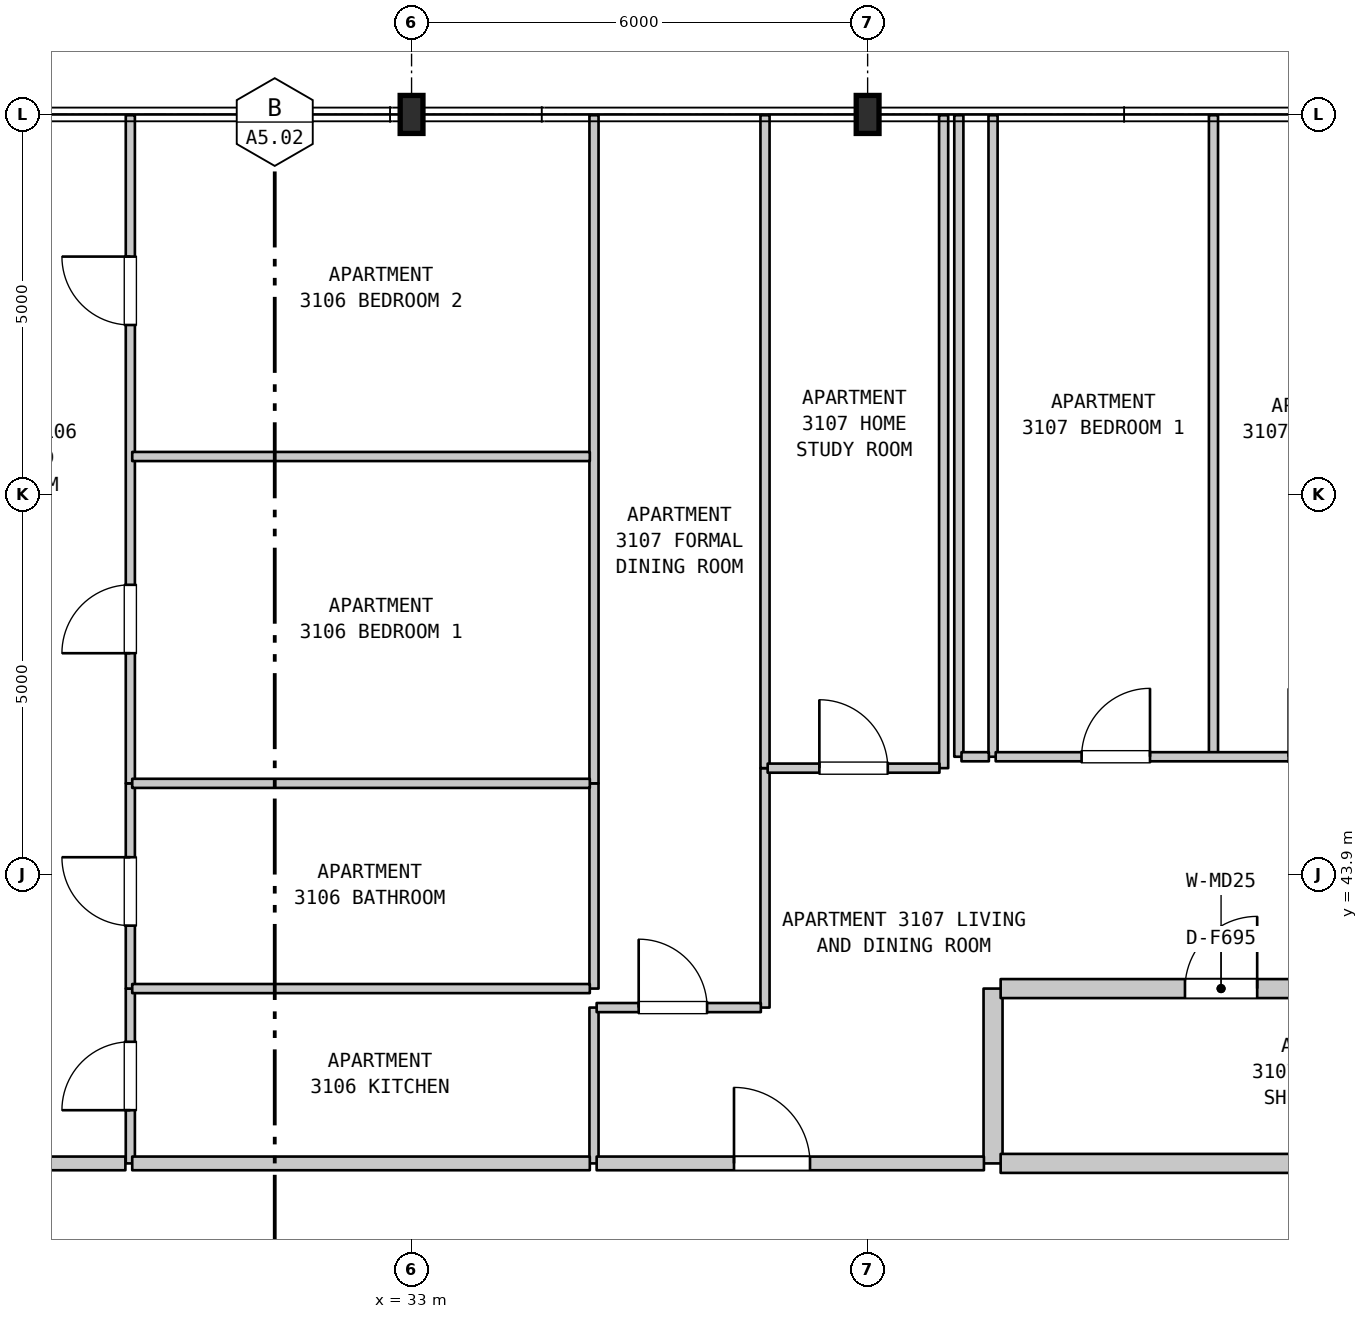
"""IFC4 building model, lengths in metres.
Left out: names, types, materials, properties, quantities, classifications, styles, units other than length and angle.
Written with IfcOpenShell. Run it as: python <this file> out.ifc"""

import sys

from ifc_helpers import new_model, si_unit, direction, frame, frame_2d, origin, origin_2d, place, context, subcontext, project, spatial, rectangle, i_section, extrude, element, fill, save


model = new_model("IFC4")
c1 = context("Model", 3, precision=1e-05, world=origin(), true_north=direction((0.0, 1.0)))
c2 = subcontext(c1, "Body", "Model", "MODEL_VIEW")
j1 = project(units=[si_unit("LENGTHUNIT", "METRE"), si_unit("PLANEANGLEUNIT", "RADIAN")], contexts=[c1])
p1 = place(None, origin())
s1 = spatial("IfcSite", under=j1, at=p1, CompositionType="ELEMENT")
p2 = place(p1, origin())
s2 = spatial("IfcBuilding", under=s1, at=p2, CompositionType="ELEMENT")
p3 = place(p2, frame((0.0, 0.0, 129.8)))
s3 = spatial("IfcBuildingStorey", under=s2, at=p3, CompositionType="ELEMENT", Elevation=129.8)
for number, where, z_axis, x_axis in (
    (1, (33.0, 53.9, 0.0), (0.0, 0.0, 1.0), (1.0, 0.0, 0.0)),
    (2, (39.0, 53.9, 0.0), (0.0, 0.0, 1.0), (1.0, 0.0, 0.0)),
):
    element("IfcColumn", number, at=place(p3, frame(where, z_axis=z_axis, x_axis=x_axis)), inside=s3, PredefinedType="COLUMN", context=c2, shape_type="SweptSolid", body=[
        extrude(i_section(OverallWidth=0.3, OverallDepth=0.5, WebThickness=0.014, FlangeThickness=0.028, FilletRadius=0.027, at=origin_2d()), origin(), (0.0, 0.0, 1.0), 3.7),
    ])
p4 = place(p3, frame((29.3, 40.1, 0.0), z_axis=(0.0, 0.0, 1.0), x_axis=(0.0, 1.0, 0.0)))
e3 = element("IfcWall", 3, at=p4, inside=s3, PredefinedType="PARTITIONING", context=c2, shape_type="SweptSolid", body=[
    extrude(rectangle(XDim=2.3, YDim=0.12, at=frame_2d((1.15, 0.0))), origin(), (0.0, 0.0, 1.0), 3.385),
])
p5 = place(p4, frame((0.7, 0.0, 0.0)))
e4 = element("IfcOpeningElement", 4, at=p5, cuts=e3, PredefinedType="OPENING", context=c2, shape_type="SweptSolid", body=[
    extrude(rectangle(XDim=0.9, YDim=2.15, at=frame_2d((0.45, 1.075))), frame((0.0, 0.07, 0.0), z_axis=(0.0, -1.0, 0.0), x_axis=(1.0, 0.0, 0.0)), (0.0, 0.0, 1.0), 0.14),
])
p6 = place(p3, frame((29.3, 42.4, 0.0), z_axis=(0.0, 0.0, 1.0), x_axis=(0.0, 1.0, 0.0)))
e5 = element("IfcWall", 5, at=p6, inside=s3, PredefinedType="PARTITIONING", context=c2, shape_type="SweptSolid", body=[
    extrude(rectangle(XDim=2.7, YDim=0.12, at=frame_2d((1.35, 0.0))), origin(), (0.0, 0.0, 1.0), 3.385),
])
p7 = place(p6, frame((0.828, 0.0, 0.0)))
e6 = element("IfcOpeningElement", 6, at=p7, cuts=e5, PredefinedType="OPENING", context=c2, shape_type="SweptSolid", body=[
    extrude(rectangle(XDim=0.9, YDim=2.1, at=frame_2d((0.45, 1.05))), frame((0.0, 0.07, 0.0), z_axis=(0.0, -1.0, 0.0), x_axis=(1.0, 0.0, 0.0)), (0.0, 0.0, 1.0), 0.14),
])
p8 = place(p3, frame((29.3, 45.1, 0.0), z_axis=(0.0, 0.0, 1.0), x_axis=(0.0, 1.0, 0.0)))
e7 = element("IfcWall", 7, at=p8, inside=s3, PredefinedType="PARTITIONING", context=c2, shape_type="SweptSolid", body=[
    extrude(rectangle(XDim=8.79, YDim=0.12, at=frame_2d((4.395, 0.0))), origin(), (0.0, 0.0, 1.0), 3.385),
])
p9 = place(p8, frame((1.712, 0.0, 0.0)))
e8 = element("IfcOpeningElement", 8, at=p9, cuts=e7, PredefinedType="OPENING", context=c2, shape_type="SweptSolid", body=[
    extrude(rectangle(XDim=0.9, YDim=2.15, at=frame_2d((0.45, 1.075))), frame((0.0, 0.07, 0.0), z_axis=(0.0, -1.0, 0.0), x_axis=(1.0, 0.0, 0.0)), (0.0, 0.0, 1.0), 0.14),
])
p10 = place(p8, frame((6.03, 0.0, 0.0)))
e9 = element("IfcOpeningElement", 9, at=p10, cuts=e7, PredefinedType="OPENING", context=c2, shape_type="SweptSolid", body=[
    extrude(rectangle(XDim=0.9, YDim=2.15, at=frame_2d((0.45, 1.075))), frame((0.0, 0.07, 0.0), z_axis=(0.0, -1.0, 0.0), x_axis=(1.0, 0.0, 0.0)), (0.0, 0.0, 1.0), 0.14),
])
p11 = place(p3, frame((35.4, 40.1, 0.0), z_axis=(0.0, 0.0, 1.0), x_axis=(0.0, 1.0, 0.0)))
e10 = element("IfcWall", 10, at=p11, inside=s3, PredefinedType="PARTITIONING", context=c2, shape_type="SweptSolid", body=[
    extrude(rectangle(XDim=2.05, YDim=0.12, at=frame_2d((1.025, 0.0))), origin(), (0.0, 0.0, 1.0), 3.385),
])
p12 = place(p3, frame((35.4, 42.4, 0.0), z_axis=(0.0, 0.0, 1.0), x_axis=(0.0, 1.0, 0.0)))
e11 = element("IfcWall", 11, at=p12, inside=s3, PredefinedType="PARTITIONING", context=c2, shape_type="SweptSolid", body=[
    extrude(rectangle(XDim=2.7, YDim=0.12, at=frame_2d((1.35, 0.0))), origin(), (0.0, 0.0, 1.0), 3.385),
])
p13 = place(p3, frame((35.4, 45.1, 0.0), z_axis=(0.0, 0.0, 1.0), x_axis=(0.0, 1.0, 0.0)))
e12 = element("IfcWall", 12, at=p13, inside=s3, PredefinedType="PARTITIONING", context=c2, shape_type="SweptSolid", body=[
    extrude(rectangle(XDim=8.79, YDim=0.12, at=frame_2d((4.395, 0.0))), origin(), (0.0, 0.0, 1.0), 3.385),
])
p14 = place(p3, frame((37.65, 42.15, 0.0), z_axis=(0.0, 0.0, 1.0), x_axis=(0.0, 1.0, 0.0)))
e13 = element("IfcWall", 13, at=p14, inside=s3, PredefinedType="PARTITIONING", context=c2, shape_type="SweptSolid", body=[
    extrude(rectangle(XDim=3.15, YDim=0.12, at=frame_2d((1.575, 0.0))), origin(), (0.0, 0.0, 1.0), 3.385),
])
for number, where, z_axis, x_axis in (
    (14, (37.65, 45.3, 0.0), (0.0, 0.0, 1.0), (0.0, 1.0, 0.0)),
    (15, (40.0, 45.3, 0.0), (0.0, 0.0, 1.0), (0.0, 1.0, 0.0)),
):
    element("IfcWall", number, at=place(p3, frame(where, z_axis=z_axis, x_axis=x_axis)), inside=s3, PredefinedType="PARTITIONING", context=c2, shape_type="SweptSolid", body=[
        extrude(rectangle(XDim=8.59, YDim=0.12, at=frame_2d((4.295, 0.0))), origin(), (0.0, 0.0, 1.0), 3.385),
    ])
p15 = place(p3, frame((40.2, 45.45, 0.0), z_axis=(0.0, 0.0, 1.0), x_axis=(0.0, 1.0, 0.0)))
e16 = element("IfcWall", 16, at=p15, inside=s3, PredefinedType="PARTITIONING", context=c2, shape_type="SweptSolid", body=[
    extrude(rectangle(XDim=8.44, YDim=0.12, at=frame_2d((4.22, 0.0))), origin(), (0.0, 0.0, 1.0), 3.385),
])
p16 = place(p3, frame((40.65, 40.1, 0.0), z_axis=(0.0, 0.0, 1.0), x_axis=(0.0, 1.0, 0.0)))
e17 = element("IfcWall", 17, at=p16, inside=s3, PredefinedType="STANDARD", context=c2, shape_type="SweptSolid", body=[
    extrude(rectangle(XDim=2.3, YDim=0.25, at=frame_2d((1.15, 0.0))), origin(), (0.0, 0.0, 1.0), 3.385),
])
for number, where, z_axis, x_axis in (
    (18, (40.65, 45.45, 0.0), (0.0, 0.0, 1.0), (0.0, 1.0, 0.0)),
    (19, (43.55, 45.45, 0.0), (0.0, 0.0, 1.0), (0.0, 1.0, 0.0)),
):
    element("IfcWall", number, at=place(p3, frame(where, z_axis=z_axis, x_axis=x_axis)), inside=s3, PredefinedType="PARTITIONING", context=c2, shape_type="SweptSolid", body=[
        extrude(rectangle(XDim=8.44, YDim=0.12, at=frame_2d((4.22, 0.0))), origin(), (0.0, 0.0, 1.0), 3.385),
    ])
p17 = place(p3, frame((20.475, 40.1, 0.0), z_axis=(0.0, 0.0, 1.0), x_axis=(1.0, 0.0, 0.0)))
e20 = element("IfcWall", 20, at=p17, inside=s3, PredefinedType="STANDARD", context=c2, shape_type="SweptSolid", body=[
    extrude(rectangle(XDim=8.76, YDim=0.18, at=frame_2d((4.38, 0.0))), origin(), (0.0, 0.0, 1.0), 3.385),
])
p18 = place(p17, frame((2.035, 0.0, 0.0)))
e21 = element("IfcOpeningElement", 21, at=p18, cuts=e20, PredefinedType="OPENING", context=c2, shape_type="SweptSolid", body=[
    extrude(rectangle(XDim=1.0, YDim=2.15, at=frame_2d((0.5, 1.075))), frame((0.0, 0.1, 0.0), z_axis=(0.0, -1.0, 0.0), x_axis=(1.0, 0.0, 0.0)), (0.0, 0.0, 1.0), 0.2),
])
p19 = place(p17, frame((6.409, 0.0, 0.0)))
e22 = element("IfcOpeningElement", 22, at=p19, cuts=e20, PredefinedType="OPENING", context=c2, shape_type="SweptSolid", body=[
    extrude(rectangle(XDim=1.0, YDim=2.15, at=frame_2d((0.5, 1.075))), frame((0.0, 0.1, 0.0), z_axis=(0.0, -1.0, 0.0), x_axis=(1.0, 0.0, 0.0)), (0.0, 0.0, 1.0), 0.2),
])
p20 = place(p3, frame((29.325, 40.1, 0.0), z_axis=(0.0, 0.0, 1.0), x_axis=(1.0, 0.0, 0.0)))
e23 = element("IfcWall", 23, at=p20, inside=s3, PredefinedType="STANDARD", context=c2, shape_type="SweptSolid", body=[
    extrude(rectangle(XDim=6.02, YDim=0.18, at=frame_2d((3.01, 0.0))), origin(), (0.0, 0.0, 1.0), 3.385),
])
p21 = place(p3, frame((35.435, 40.1, 0.0), z_axis=(0.0, 0.0, 1.0), x_axis=(1.0, 0.0, 0.0)))
e24 = element("IfcWall", 24, at=p21, inside=s3, PredefinedType="STANDARD", context=c2, shape_type="SweptSolid", body=[
    extrude(rectangle(XDim=5.095, YDim=0.18, at=frame_2d((2.547, 0.0))), origin(), (0.0, 0.0, 1.0), 3.385),
])
p22 = place(p21, frame((1.807, 0.0, 0.0)))
e25 = element("IfcOpeningElement", 25, at=p22, cuts=e24, PredefinedType="OPENING", context=c2, shape_type="SweptSolid", body=[
    extrude(rectangle(XDim=1.0, YDim=2.15, at=frame_2d((0.5, 1.075))), frame((0.0, 0.1, 0.0), z_axis=(0.0, -1.0, 0.0), x_axis=(1.0, 0.0, 0.0)), (0.0, 0.0, 1.0), 0.2),
])
p23 = place(p3, frame((40.75, 40.1, 0.0), z_axis=(0.0, 0.0, 1.0), x_axis=(1.0, 0.0, 0.0)))
e26 = element("IfcWall", 26, at=p23, inside=s3, PredefinedType="STANDARD", context=c2, shape_type="SweptSolid", body=[
    extrude(rectangle(XDim=4.19, YDim=0.25, at=frame_2d((2.095, 0.0))), origin(), (0.0, 0.0, 1.0), 3.385),
])
p24 = place(p3, frame((35.435, 42.15, 0.0), z_axis=(0.0, 0.0, 1.0), x_axis=(1.0, 0.0, 0.0)))
e27 = element("IfcWall", 27, at=p24, inside=s3, PredefinedType="PARTITIONING", context=c2, shape_type="SweptSolid", body=[
    extrude(rectangle(XDim=2.16, YDim=0.12, at=frame_2d((1.08, 0.0))), origin(), (0.0, 0.0, 1.0), 3.385),
])
p25 = place(p24, frame((0.553, 0.0, 0.0)))
e28 = element("IfcOpeningElement", 28, at=p25, cuts=e27, PredefinedType="OPENING", context=c2, shape_type="SweptSolid", body=[
    extrude(rectangle(XDim=0.9, YDim=2.15, at=frame_2d((0.45, 1.075))), frame((0.0, 0.07, 0.0), z_axis=(0.0, -1.0, 0.0), x_axis=(1.0, 0.0, 0.0)), (0.0, 0.0, 1.0), 0.14),
])
p26 = place(p3, frame((29.325, 42.4, 0.0), z_axis=(0.0, 0.0, 1.0), x_axis=(1.0, 0.0, 0.0)))
e29 = element("IfcWall", 29, at=p26, inside=s3, PredefinedType="PARTITIONING", context=c2, shape_type="SweptSolid", body=[
    extrude(rectangle(XDim=6.02, YDim=0.12, at=frame_2d((3.01, 0.0))), origin(), (0.0, 0.0, 1.0), 3.385),
])
p27 = place(p3, frame((40.75, 42.4, 0.0), z_axis=(0.0, 0.0, 1.0), x_axis=(1.0, 0.0, 0.0)))
e30 = element("IfcWall", 30, at=p27, inside=s3, PredefinedType="STANDARD", context=c2, shape_type="SweptSolid", body=[
    extrude(rectangle(XDim=5.8, YDim=0.25, at=frame_2d((2.9, 0.0))), origin(), (0.0, 0.0, 1.0), 3.385),
])
p28 = place(p27, frame((2.425, 0.0, 0.0)))
e31 = element("IfcOpeningElement", 31, at=p28, cuts=e30, PredefinedType="OPENING", context=c2, shape_type="SweptSolid", body=[
    extrude(rectangle(XDim=0.95, YDim=2.15, at=frame_2d((0.475, 1.075))), frame((0.0, 0.135, 0.0), z_axis=(0.0, -1.0, 0.0), x_axis=(1.0, 0.0, 0.0)), (0.0, 0.0, 1.0), 0.27),
])
p29 = place(p3, frame((29.325, 45.1, 0.0), z_axis=(0.0, 0.0, 1.0), x_axis=(1.0, 0.0, 0.0)))
e32 = element("IfcWall", 32, at=p29, inside=s3, PredefinedType="PARTITIONING", context=c2, shape_type="SweptSolid", body=[
    extrude(rectangle(XDim=6.02, YDim=0.12, at=frame_2d((3.01, 0.0))), origin(), (0.0, 0.0, 1.0), 3.385),
])
p30 = place(p3, frame((37.685, 45.3, 0.0), z_axis=(0.0, 0.0, 1.0), x_axis=(1.0, 0.0, 0.0)))
e33 = element("IfcWall", 33, at=p30, inside=s3, PredefinedType="PARTITIONING", context=c2, shape_type="SweptSolid", body=[
    extrude(rectangle(XDim=2.26, YDim=0.12, at=frame_2d((1.13, 0.0))), origin(), (0.0, 0.0, 1.0), 3.385),
])
p31 = place(p30, frame((0.68, 0.0, 0.0)))
e34 = element("IfcOpeningElement", 34, at=p31, cuts=e33, PredefinedType="OPENING", context=c2, shape_type="SweptSolid", body=[
    extrude(rectangle(XDim=0.9, YDim=2.15, at=frame_2d((0.45, 1.075))), frame((0.0, 0.07, 0.0), z_axis=(0.0, -1.0, 0.0), x_axis=(1.0, 0.0, 0.0)), (0.0, 0.0, 1.0), 0.14),
])
p32 = place(p3, frame((40.235, 45.45, 0.0), z_axis=(0.0, 0.0, 1.0), x_axis=(1.0, 0.0, 0.0)))
e35 = element("IfcWall", 35, at=p32, inside=s3, PredefinedType="PARTITIONING", context=c2, shape_type="SweptSolid", body=[
    extrude(rectangle(XDim=0.36, YDim=0.12, at=frame_2d((0.18, 0.0))), origin(), (0.0, 0.0, 1.0), 3.385),
])
p33 = place(p3, frame((40.685, 45.45, 0.0), z_axis=(0.0, 0.0, 1.0), x_axis=(1.0, 0.0, 0.0)))
e36 = element("IfcWall", 36, at=p33, inside=s3, PredefinedType="PARTITIONING", context=c2, shape_type="SweptSolid", body=[
    extrude(rectangle(XDim=16.643, YDim=0.12, at=frame_2d((8.321, 0.0))), origin(), (0.0, 0.0, 1.0), 3.385),
])
p34 = place(p33, frame((1.13, 0.0, 0.0)))
e37 = element("IfcOpeningElement", 37, at=p34, cuts=e36, PredefinedType="OPENING", context=c2, shape_type="SweptSolid", body=[
    extrude(rectangle(XDim=0.9, YDim=2.15, at=frame_2d((0.45, 1.075))), frame((0.0, 0.07, 0.0), z_axis=(0.0, -1.0, 0.0), x_axis=(1.0, 0.0, 0.0)), (0.0, 0.0, 1.0), 0.14),
])
p35 = place(p33, frame((3.854, 0.0, 0.0)))
e38 = element("IfcOpeningElement", 38, at=p35, cuts=e36, PredefinedType="OPENING", context=c2, shape_type="SweptSolid", body=[
    extrude(rectangle(XDim=0.9, YDim=2.15, at=frame_2d((0.45, 1.075))), frame((0.0, 0.07, 0.0), z_axis=(0.0, -1.0, 0.0), x_axis=(1.0, 0.0, 0.0)), (0.0, 0.0, 1.0), 0.14),
])
p36 = place(p33, frame((6.754, 0.0, 0.0)))
e39 = element("IfcOpeningElement", 39, at=p36, cuts=e36, PredefinedType="OPENING", context=c2, shape_type="SweptSolid", body=[
    extrude(rectangle(XDim=0.9, YDim=2.15, at=frame_2d((0.45, 1.075))), frame((0.0, 0.07, 0.0), z_axis=(0.0, -1.0, 0.0), x_axis=(1.0, 0.0, 0.0)), (0.0, 0.0, 1.0), 0.14),
])
p37 = place(p33, frame((9.654, 0.0, 0.0)))
e40 = element("IfcOpeningElement", 40, at=p37, cuts=e36, PredefinedType="OPENING", context=c2, shape_type="SweptSolid", body=[
    extrude(rectangle(XDim=0.9, YDim=2.15, at=frame_2d((0.45, 1.075))), frame((0.0, 0.07, 0.0), z_axis=(0.0, -1.0, 0.0), x_axis=(1.0, 0.0, 0.0)), (0.0, 0.0, 1.0), 0.14),
])
p38 = place(p33, frame((12.553, 0.0, 0.0)))
e41 = element("IfcOpeningElement", 41, at=p38, cuts=e36, PredefinedType="OPENING", context=c2, shape_type="SweptSolid", body=[
    extrude(rectangle(XDim=0.9, YDim=2.15, at=frame_2d((0.45, 1.075))), frame((0.0, 0.07, 0.0), z_axis=(0.0, -1.0, 0.0), x_axis=(1.0, 0.0, 0.0)), (0.0, 0.0, 1.0), 0.14),
])
p39 = place(p3, frame((29.325, 49.4, 0.0), z_axis=(0.0, 0.0, 1.0), x_axis=(1.0, 0.0, 0.0)))
e42 = element("IfcWall", 42, at=p39, inside=s3, PredefinedType="PARTITIONING", context=c2, shape_type="SweptSolid", body=[
    extrude(rectangle(XDim=6.02, YDim=0.12, at=frame_2d((3.01, 0.0))), origin(), (0.0, 0.0, 1.0), 3.385),
])
p40 = place(p5, origin())
e43 = element("IfcDoor", 43, at=p40, inside=s3, OperationType="SINGLE_SWING_LEFT", PredefinedType="DOOR", context=c2, shape_type="SweptSolid", body=[
    extrude(rectangle(XDim=0.9, YDim=2.15, at=frame_2d((0.45, 1.075))), frame((0.0, 0.025, 0.0), z_axis=(0.0, -1.0, 0.0), x_axis=(1.0, 0.0, 0.0)), (0.0, 0.0, 1.0), 0.05),
])
fill(e4, e43)
p41 = place(p7, origin())
e44 = element("IfcDoor", 44, at=p41, inside=s3, OperationType="SINGLE_SWING_RIGHT", PredefinedType="DOOR", context=c2, shape_type="SweptSolid", body=[
    extrude(rectangle(XDim=0.9, YDim=2.1, at=frame_2d((0.45, 1.05))), frame((0.0, 0.025, 0.0), z_axis=(0.0, -1.0, 0.0), x_axis=(1.0, 0.0, 0.0)), (0.0, 0.0, 1.0), 0.05),
])
fill(e6, e44)
p42 = place(p9, origin())
e45 = element("IfcDoor", 45, at=p42, inside=s3, OperationType="SINGLE_SWING_LEFT", PredefinedType="DOOR", context=c2, shape_type="SweptSolid", body=[
    extrude(rectangle(XDim=0.9, YDim=2.15, at=frame_2d((0.45, 1.075))), frame((0.0, 0.025, 0.0), z_axis=(0.0, -1.0, 0.0), x_axis=(1.0, 0.0, 0.0)), (0.0, 0.0, 1.0), 0.05),
])
fill(e8, e45)
p43 = place(p10, origin())
e46 = element("IfcDoor", 46, at=p43, inside=s3, OperationType="SINGLE_SWING_RIGHT", PredefinedType="DOOR", context=c2, shape_type="SweptSolid", body=[
    extrude(rectangle(XDim=0.9, YDim=2.15, at=frame_2d((0.45, 1.075))), frame((0.0, 0.025, 0.0), z_axis=(0.0, -1.0, 0.0), x_axis=(1.0, 0.0, 0.0)), (0.0, 0.0, 1.0), 0.05),
])
fill(e9, e46)
p44 = place(p22, origin())
e47 = element("IfcDoor", 47, at=p44, inside=s3, OperationType="SINGLE_SWING_LEFT", PredefinedType="DOOR", context=c2, shape_type="SweptSolid", body=[
    extrude(rectangle(XDim=1.0, YDim=2.15, at=frame_2d((0.5, 1.075))), frame((0.0, 0.025, 0.0), z_axis=(0.0, -1.0, 0.0), x_axis=(1.0, 0.0, 0.0)), (0.0, 0.0, 1.0), 0.05),
])
fill(e25, e47)
p45 = place(p25, origin())
e48 = element("IfcDoor", 48, at=p45, inside=s3, OperationType="SINGLE_SWING_LEFT", PredefinedType="DOOR", context=c2, shape_type="SweptSolid", body=[
    extrude(rectangle(XDim=0.9, YDim=2.15, at=frame_2d((0.45, 1.075))), frame((0.0, 0.025, 0.0), z_axis=(0.0, -1.0, 0.0), x_axis=(1.0, 0.0, 0.0)), (0.0, 0.0, 1.0), 0.05),
])
fill(e28, e48)
p46 = place(p28, origin())
e49 = element("IfcDoor", 49, at=p46, inside=s3, OperationType="SINGLE_SWING_RIGHT", PredefinedType="DOOR", context=c2, shape_type="SweptSolid", body=[
    extrude(rectangle(XDim=0.95, YDim=2.15, at=frame_2d((0.475, 1.075))), frame((0.0, 0.025, 0.0), z_axis=(0.0, -1.0, 0.0), x_axis=(1.0, 0.0, 0.0)), (0.0, 0.0, 1.0), 0.05),
])
fill(e31, e49)
p47 = place(p31, origin())
e50 = element("IfcDoor", 50, at=p47, inside=s3, OperationType="SINGLE_SWING_LEFT", PredefinedType="DOOR", context=c2, shape_type="SweptSolid", body=[
    extrude(rectangle(XDim=0.9, YDim=2.15, at=frame_2d((0.45, 1.075))), frame((0.0, 0.025, 0.0), z_axis=(0.0, -1.0, 0.0), x_axis=(1.0, 0.0, 0.0)), (0.0, 0.0, 1.0), 0.05),
])
fill(e34, e50)
p48 = place(p34, origin())
e51 = element("IfcDoor", 51, at=p48, inside=s3, OperationType="SINGLE_SWING_RIGHT", PredefinedType="DOOR", context=c2, shape_type="SweptSolid", body=[
    extrude(rectangle(XDim=0.9, YDim=2.15, at=frame_2d((0.45, 1.075))), frame((0.0, 0.025, 0.0), z_axis=(0.0, -1.0, 0.0), x_axis=(1.0, 0.0, 0.0)), (0.0, 0.0, 1.0), 0.05),
])
fill(e37, e51)
p49 = place(p35, origin())
e52 = element("IfcDoor", 52, at=p49, inside=s3, OperationType="SINGLE_SWING_LEFT", PredefinedType="DOOR", context=c2, shape_type="SweptSolid", body=[
    extrude(rectangle(XDim=0.9, YDim=2.15, at=frame_2d((0.45, 1.075))), frame((0.0, 0.025, 0.0), z_axis=(0.0, -1.0, 0.0), x_axis=(1.0, 0.0, 0.0)), (0.0, 0.0, 1.0), 0.05),
])
fill(e38, e52)
save(model, sys.argv[1])
